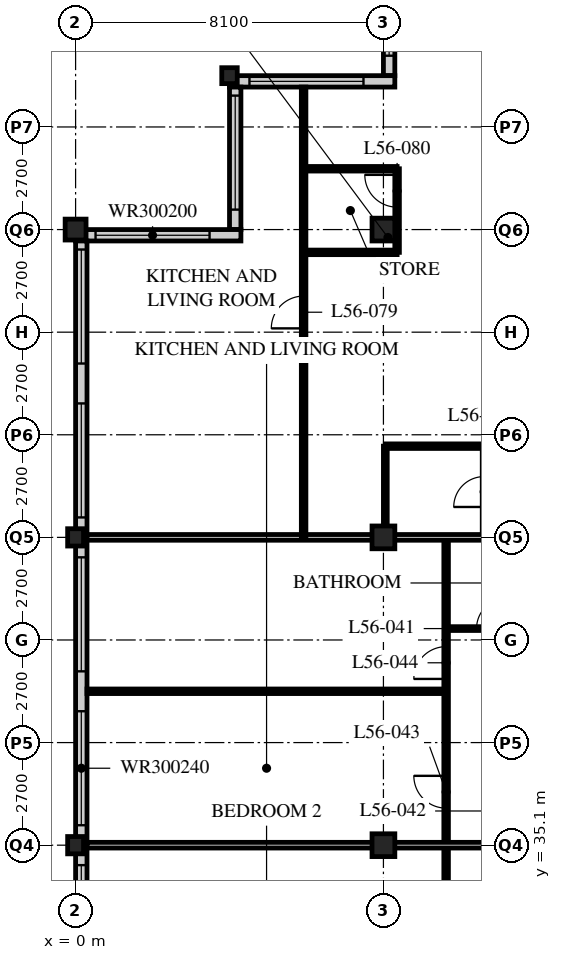
"""IFC4 building model, lengths in metres.
Left out: names, types, materials, properties, quantities, classifications, styles, units other than length and angle.
Written with IfcOpenShell. Run it as: python <this file> out.ifc"""

import sys

from ifc_helpers import new_model, si_unit, direction, frame, frame_2d, origin, origin_2d, place, context, subcontext, project, spatial, rectangle, hollow_rectangle, i_section, extrude, element, fill, save


model = new_model("IFC4")
c1 = context("Model", 3, precision=1e-05, world=origin(), true_north=direction((0.0, 1.0)))
c2 = subcontext(c1, "Body", "Model", "MODEL_VIEW")
j1 = project(units=[si_unit("LENGTHUNIT", "METRE"), si_unit("PLANEANGLEUNIT", "RADIAN")], contexts=[c1])
p1 = place(None, origin())
s1 = spatial("IfcSite", under=j1, at=p1, CompositionType="ELEMENT")
p2 = place(p1, origin())
s2 = spatial("IfcBuilding", under=s1, at=p2, CompositionType="ELEMENT")
p3 = place(p2, frame((0.0, 0.0, 217.2)))
s3 = spatial("IfcBuildingStorey", under=s2, at=p3, CompositionType="ELEMENT", Elevation=217.2)
for number, where, z_axis, x_axis in (
    (1, (0.0, 35.1, 0.0), (0.0, 0.0, 1.0), (1.0, 0.0, 0.0)),
    (2, (0.0, 43.2, 0.0), (0.0, 0.0, 1.0), (1.0, 0.0, 0.0)),
):
    element("IfcColumn", number, at=place(p3, frame(where, z_axis=z_axis, x_axis=x_axis)), inside=s3, PredefinedType="COLUMN", context=c2, shape_type="SweptSolid", body=[
        extrude(i_section(OverallWidth=0.418, OverallDepth=0.456, WebThickness=0.042, FlangeThickness=0.067, FilletRadius=0.015, at=origin_2d()), origin(), (0.0, 0.0, 1.0), 3.6),
    ])
p4 = place(p3, frame((0.0, 51.3, 0.0), z_axis=(0.0, 0.0, 1.0), x_axis=(1.0, 0.0, 0.0)))
e3 = element("IfcColumn", 3, at=p4, inside=s3, PredefinedType="COLUMN", context=c2, shape_type="SweptSolid", body=[
    extrude(hollow_rectangle(XDim=0.55, YDim=0.55, WallThickness=0.045, at=origin_2d()), origin(), (0.0, 0.0, 1.0), 3.6),
])
p5 = place(p3, frame((4.05, 55.35, 0.0), z_axis=(0.0, 0.0, 1.0), x_axis=(1.0, 0.0, 0.0)))
e4 = element("IfcColumn", 4, at=p5, inside=s3, PredefinedType="COLUMN", context=c2, shape_type="SweptSolid", body=[
    extrude(i_section(OverallWidth=0.407, OverallDepth=0.419, WebThickness=0.031, FlangeThickness=0.049, FilletRadius=0.015, at=origin_2d()), origin(), (0.0, 0.0, 1.0), 3.6),
])
for number, where, z_axis, x_axis in (
    (5, (8.1, 35.1, 0.0), (0.0, 0.0, 1.0), (1.0, 0.0, 0.0)),
    (6, (8.1, 43.2, 0.0), (0.0, 0.0, 1.0), (1.0, 0.0, 0.0)),
    (7, (8.1, 51.3, 0.0), (0.0, 0.0, 1.0), (1.0, 0.0, 0.0)),
):
    element("IfcColumn", number, at=place(p3, frame(where, z_axis=z_axis, x_axis=x_axis)), inside=s3, PredefinedType="COLUMN", context=c2, shape_type="SweptSolid", body=[
        extrude(hollow_rectangle(XDim=0.6, YDim=0.6, WallThickness=0.05, at=origin_2d()), origin(), (0.0, 0.0, 1.0), 3.6),
    ])
p6 = place(p3, frame((8.25, 59.1, 0.0), z_axis=(0.0, 0.0, 1.0), x_axis=(0.0, -1.0, 0.0)))
e8 = element("IfcWall", 8, at=p6, inside=s3, PredefinedType="SOLIDWALL", context=c2, shape_type="SweptSolid", body=[
    extrude(rectangle(XDim=3.75, YDim=0.3, at=frame_2d((1.875, 0.0))), origin(), (0.0, 0.0, 1.0), 3.39),
])
p7 = place(p6, frame((0.225, 0.0, 0.6)))
e9 = element("IfcOpeningElement", 9, at=p7, cuts=e8, PredefinedType="OPENING", context=c2, shape_type="SweptSolid", body=[
    extrude(rectangle(XDim=3.0, YDim=2.0, at=frame_2d((1.5, 1.0))), frame((0.0, 0.16, 0.0), z_axis=(0.0, -1.0, 0.0), x_axis=(1.0, 0.0, 0.0)), (0.0, 0.0, 1.0), 0.32),
])
p8 = place(p3, frame((8.4, 55.2, 0.0), z_axis=(0.0, 0.0, 1.0), x_axis=(-1.0, 0.0, 0.0)))
e10 = element("IfcWall", 10, at=p8, inside=s3, PredefinedType="SOLIDWALL", context=c2, shape_type="SweptSolid", body=[
    extrude(rectangle(XDim=4.35, YDim=0.3, at=frame_2d((2.175, 0.0))), origin(), (0.0, 0.0, 1.0), 3.39),
])
p9 = place(p8, frame((0.825, 0.0, 0.6)))
e11 = element("IfcOpeningElement", 11, at=p9, cuts=e10, PredefinedType="OPENING", context=c2, shape_type="SweptSolid", body=[
    extrude(rectangle(XDim=3.0, YDim=2.0, at=frame_2d((1.5, 1.0))), frame((0.0, 0.16, 0.0), z_axis=(0.0, -1.0, 0.0), x_axis=(1.0, 0.0, 0.0)), (0.0, 0.0, 1.0), 0.32),
])
p10 = place(p3, frame((4.2, 55.05, 0.0), z_axis=(0.0, 0.0, 1.0), x_axis=(0.0, -1.0, 0.0)))
e12 = element("IfcWall", 12, at=p10, inside=s3, PredefinedType="SOLIDWALL", context=c2, shape_type="SweptSolid", body=[
    extrude(rectangle(XDim=3.75, YDim=0.3, at=frame_2d((1.875, 0.0))), origin(), (0.0, 0.0, 1.0), 3.39),
])
p11 = place(p10, frame((0.225, 0.0, 0.6)))
e13 = element("IfcOpeningElement", 13, at=p11, cuts=e12, PredefinedType="OPENING", context=c2, shape_type="SweptSolid", body=[
    extrude(rectangle(XDim=3.0, YDim=2.0, at=frame_2d((1.5, 1.0))), frame((0.0, 0.16, 0.0), z_axis=(0.0, -1.0, 0.0), x_axis=(1.0, 0.0, 0.0)), (0.0, 0.0, 1.0), 0.32),
])
p12 = place(p3, frame((4.35, 51.15, 0.0), z_axis=(0.0, 0.0, 1.0), x_axis=(-1.0, 0.0, 0.0)))
e14 = element("IfcWall", 14, at=p12, inside=s3, PredefinedType="SOLIDWALL", context=c2, shape_type="SweptSolid", body=[
    extrude(rectangle(XDim=4.35, YDim=0.3, at=frame_2d((2.175, 0.0))), origin(), (0.0, 0.0, 1.0), 3.39),
])
p13 = place(p12, frame((0.825, 0.0, 0.6)))
e15 = element("IfcOpeningElement", 15, at=p13, cuts=e14, PredefinedType="OPENING", context=c2, shape_type="SweptSolid", body=[
    extrude(rectangle(XDim=3.0, YDim=2.0, at=frame_2d((1.5, 1.0))), frame((0.0, 0.16, 0.0), z_axis=(0.0, -1.0, 0.0), x_axis=(1.0, 0.0, 0.0)), (0.0, 0.0, 1.0), 0.32),
])
p14 = place(p3, frame((0.15, 51.0, 0.0), z_axis=(0.0, 0.0, 1.0), x_axis=(0.0, -1.0, 0.0)))
e16 = element("IfcWall", 16, at=p14, inside=s3, PredefinedType="SOLIDWALL", context=c2, shape_type="SweptSolid", body=[
    extrude(rectangle(XDim=32.1, YDim=0.3, at=frame_2d((16.05, 0.0))), origin(), (0.0, 0.0, 1.0), 3.39),
])
p15 = place(p14, frame((0.225, 0.0, 0.6)))
e17 = element("IfcOpeningElement", 17, at=p15, cuts=e16, PredefinedType="OPENING", context=c2, shape_type="SweptSolid", body=[
    extrude(rectangle(XDim=3.0, YDim=2.4, at=frame_2d((1.5, 1.2))), frame((0.0, 0.16, 0.0), z_axis=(0.0, -1.0, 0.0), x_axis=(1.0, 0.0, 0.0)), (0.0, 0.0, 1.0), 0.32),
])
p16 = place(p14, frame((4.275, 0.0, 0.6)))
e18 = element("IfcOpeningElement", 18, at=p16, cuts=e16, PredefinedType="OPENING", context=c2, shape_type="SweptSolid", body=[
    extrude(rectangle(XDim=3.0, YDim=2.4, at=frame_2d((1.5, 1.2))), frame((0.0, 0.16, 0.0), z_axis=(0.0, -1.0, 0.0), x_axis=(1.0, 0.0, 0.0)), (0.0, 0.0, 1.0), 0.32),
])
p17 = place(p14, frame((8.325, 0.0, 0.6)))
e19 = element("IfcOpeningElement", 19, at=p17, cuts=e16, PredefinedType="OPENING", context=c2, shape_type="SweptSolid", body=[
    extrude(rectangle(XDim=3.0, YDim=2.4, at=frame_2d((1.5, 1.2))), frame((0.0, 0.16, 0.0), z_axis=(0.0, -1.0, 0.0), x_axis=(1.0, 0.0, 0.0)), (0.0, 0.0, 1.0), 0.32),
])
p18 = place(p14, frame((12.375, 0.0, 0.6)))
e20 = element("IfcOpeningElement", 20, at=p18, cuts=e16, PredefinedType="OPENING", context=c2, shape_type="SweptSolid", body=[
    extrude(rectangle(XDim=3.0, YDim=2.4, at=frame_2d((1.5, 1.2))), frame((0.0, 0.16, 0.0), z_axis=(0.0, -1.0, 0.0), x_axis=(1.0, 0.0, 0.0)), (0.0, 0.0, 1.0), 0.32),
])
p19 = place(p14, frame((16.425, 0.0, 0.6)))
e21 = element("IfcOpeningElement", 21, at=p19, cuts=e16, PredefinedType="OPENING", context=c2, shape_type="SweptSolid", body=[
    extrude(rectangle(XDim=3.0, YDim=2.4, at=frame_2d((1.5, 1.2))), frame((0.0, 0.16, 0.0), z_axis=(0.0, -1.0, 0.0), x_axis=(1.0, 0.0, 0.0)), (0.0, 0.0, 1.0), 0.32),
])
p20 = place(p14, frame((20.475, 0.0, 0.6)))
e22 = element("IfcOpeningElement", 22, at=p20, cuts=e16, PredefinedType="OPENING", context=c2, shape_type="SweptSolid", body=[
    extrude(rectangle(XDim=3.0, YDim=2.4, at=frame_2d((1.5, 1.2))), frame((0.0, 0.16, 0.0), z_axis=(0.0, -1.0, 0.0), x_axis=(1.0, 0.0, 0.0)), (0.0, 0.0, 1.0), 0.32),
])
p21 = place(p14, frame((24.525, 0.0, 0.6)))
e23 = element("IfcOpeningElement", 23, at=p21, cuts=e16, PredefinedType="OPENING", context=c2, shape_type="SweptSolid", body=[
    extrude(rectangle(XDim=3.0, YDim=2.4, at=frame_2d((1.5, 1.2))), frame((0.0, 0.16, 0.0), z_axis=(0.0, -1.0, 0.0), x_axis=(1.0, 0.0, 0.0)), (0.0, 0.0, 1.0), 0.32),
])
p22 = place(p14, frame((28.575, 0.0, 0.6)))
e24 = element("IfcOpeningElement", 24, at=p22, cuts=e16, PredefinedType="OPENING", context=c2, shape_type="SweptSolid", body=[
    extrude(rectangle(XDim=3.0, YDim=2.4, at=frame_2d((1.5, 1.2))), frame((0.0, 0.16, 0.0), z_axis=(0.0, -1.0, 0.0), x_axis=(1.0, 0.0, 0.0)), (0.0, 0.0, 1.0), 0.32),
])
p23 = place(p3, frame((9.75, 18.9, 0.0), z_axis=(0.0, 0.0, 1.0), x_axis=(0.0, 1.0, 0.0)))
e25 = element("IfcWall", 25, at=p23, inside=s3, PredefinedType="PARTITIONING", context=c2, shape_type="SweptSolid", body=[
    extrude(rectangle(XDim=24.3, YDim=0.12, at=frame_2d((12.15, 0.0))), origin(), (0.0, 0.0, 1.0), 3.39),
])
p24 = place(p23, frame((0.975, 0.0, 0.0)))
e26 = element("IfcOpeningElement", 26, at=p24, cuts=e25, PredefinedType="OPENING", context=c2, shape_type="SweptSolid", body=[
    extrude(rectangle(XDim=0.85, YDim=2.1, at=frame_2d((0.425, 1.05))), frame((0.0, 0.07, 0.0), z_axis=(0.0, -1.0, 0.0), x_axis=(1.0, 0.0, 0.0)), (0.0, 0.0, 1.0), 0.14),
])
p25 = place(p23, frame((8.425, 0.0, 0.0)))
e27 = element("IfcOpeningElement", 27, at=p25, cuts=e25, PredefinedType="OPENING", context=c2, shape_type="SweptSolid", body=[
    extrude(rectangle(XDim=0.85, YDim=2.1, at=frame_2d((0.425, 1.05))), frame((0.0, 0.07, 0.0), z_axis=(0.0, -1.0, 0.0), x_axis=(1.0, 0.0, 0.0)), (0.0, 0.0, 1.0), 0.14),
])
p26 = place(p23, frame((12.475, 0.0, 0.0)))
e28 = element("IfcOpeningElement", 28, at=p26, cuts=e25, PredefinedType="OPENING", context=c2, shape_type="SweptSolid", body=[
    extrude(rectangle(XDim=0.85, YDim=2.1, at=frame_2d((0.425, 1.05))), frame((0.0, 0.07, 0.0), z_axis=(0.0, -1.0, 0.0), x_axis=(1.0, 0.0, 0.0)), (0.0, 0.0, 1.0), 0.14),
])
p27 = place(p23, frame((17.175, 0.0, 0.0)))
e29 = element("IfcOpeningElement", 29, at=p27, cuts=e25, PredefinedType="OPENING", context=c2, shape_type="SweptSolid", body=[
    extrude(rectangle(XDim=0.85, YDim=2.1, at=frame_2d((0.425, 1.05))), frame((0.0, 0.07, 0.0), z_axis=(0.0, -1.0, 0.0), x_axis=(1.0, 0.0, 0.0)), (0.0, 0.0, 1.0), 0.14),
])
p28 = place(p23, frame((20.575, 0.0, 0.0)))
e30 = element("IfcOpeningElement", 30, at=p28, cuts=e25, PredefinedType="OPENING", context=c2, shape_type="SweptSolid", body=[
    extrude(rectangle(XDim=0.85, YDim=2.1, at=frame_2d((0.425, 1.05))), frame((0.0, 0.07, 0.0), z_axis=(0.0, -1.0, 0.0), x_axis=(1.0, 0.0, 0.0)), (0.0, 0.0, 1.0), 0.14),
])
p29 = place(p3, frame((12.15, 35.1, 0.0), z_axis=(0.0, 0.0, 1.0), x_axis=(-1.0, 0.0, 0.0)))
e31 = element("IfcWall", 31, at=p29, inside=s3, PredefinedType="PARTITIONING", context=c2, shape_type="SweptSolid", body=[
    extrude(rectangle(XDim=11.85, YDim=0.15, at=frame_2d((5.925, 0.0))), origin(), (0.0, 0.0, 1.0), 2.778),
])
p30 = place(p3, frame((12.15, 40.8, 0.0), z_axis=(0.0, 0.0, 1.0), x_axis=(-1.0, 0.0, 0.0)))
e32 = element("IfcWall", 32, at=p30, inside=s3, PredefinedType="PARTITIONING", context=c2, shape_type="SweptSolid", body=[
    extrude(rectangle(XDim=2.4, YDim=0.1, at=frame_2d((1.2, 0.0))), origin(), (0.0, 0.0, 1.0), 3.39),
])
p31 = place(p30, frame((0.8, 0.0, 0.0)))
e33 = element("IfcOpeningElement", 33, at=p31, cuts=e32, PredefinedType="OPENING", context=c2, shape_type="SweptSolid", body=[
    extrude(rectangle(XDim=0.8, YDim=2.1, at=frame_2d((0.4, 1.05))), frame((0.0, 0.06, 0.0), z_axis=(0.0, -1.0, 0.0), x_axis=(1.0, 0.0, 0.0)), (0.0, 0.0, 1.0), 0.12),
])
p32 = place(p3, frame((9.75, 39.15, 0.0), z_axis=(0.0, 0.0, 1.0), x_axis=(-1.0, 0.0, 0.0)))
e34 = element("IfcWall", 34, at=p32, inside=s3, PredefinedType="PARTITIONING", context=c2, shape_type="SweptSolid", body=[
    extrude(rectangle(XDim=9.45, YDim=0.12, at=frame_2d((4.725, 0.0))), origin(), (0.0, 0.0, 1.0), 3.39),
])
p33 = place(p3, frame((8.15, 43.2, 0.0), z_axis=(0.0, 0.0, 1.0), x_axis=(0.0, 1.0, 0.0)))
e35 = element("IfcWall", 35, at=p33, inside=s3, PredefinedType="PARTITIONING", context=c2, shape_type="SweptSolid", body=[
    extrude(rectangle(XDim=2.4, YDim=0.1, at=frame_2d((1.2, 0.0))), origin(), (0.0, 0.0, 1.0), 2.778),
])
p34 = place(p3, frame((8.15, 45.6, 0.0), z_axis=(0.0, 0.0, 1.0), x_axis=(1.0, 0.0, 0.0)))
e36 = element("IfcWall", 36, at=p34, inside=s3, PredefinedType="PARTITIONING", context=c2, shape_type="SweptSolid", body=[
    extrude(rectangle(XDim=28.3, YDim=0.12, at=frame_2d((14.15, 0.0))), origin(), (0.0, 0.0, 1.0), 3.39),
])
p35 = place(p34, frame((9.025, 0.0, 0.0)))
e37 = element("IfcOpeningElement", 37, at=p35, cuts=e36, PredefinedType="OPENING", context=c2, shape_type="SweptSolid", body=[
    extrude(rectangle(XDim=0.85, YDim=2.1, at=frame_2d((0.425, 1.05))), frame((0.0, 0.07, 0.0), z_axis=(0.0, -1.0, 0.0), x_axis=(1.0, 0.0, 0.0)), (0.0, 0.0, 1.0), 0.14),
])
p36 = place(p34, frame((16.475, 0.0, 0.0)))
e38 = element("IfcOpeningElement", 38, at=p36, cuts=e36, PredefinedType="OPENING", context=c2, shape_type="SweptSolid", body=[
    extrude(rectangle(XDim=0.85, YDim=2.1, at=frame_2d((0.425, 1.05))), frame((0.0, 0.07, 0.0), z_axis=(0.0, -1.0, 0.0), x_axis=(1.0, 0.0, 0.0)), (0.0, 0.0, 1.0), 0.14),
])
p37 = place(p34, frame((20.525, 0.0, 0.0)))
e39 = element("IfcOpeningElement", 39, at=p37, cuts=e36, PredefinedType="OPENING", context=c2, shape_type="SweptSolid", body=[
    extrude(rectangle(XDim=0.85, YDim=2.1, at=frame_2d((0.425, 1.05))), frame((0.0, 0.07, 0.0), z_axis=(0.0, -1.0, 0.0), x_axis=(1.0, 0.0, 0.0)), (0.0, 0.0, 1.0), 0.14),
])
p38 = place(p34, frame((24.575, 0.0, 0.0)))
e40 = element("IfcOpeningElement", 40, at=p38, cuts=e36, PredefinedType="OPENING", context=c2, shape_type="SweptSolid", body=[
    extrude(rectangle(XDim=0.85, YDim=2.1, at=frame_2d((0.425, 1.05))), frame((0.0, 0.07, 0.0), z_axis=(0.0, -1.0, 0.0), x_axis=(1.0, 0.0, 0.0)), (0.0, 0.0, 1.0), 0.14),
])
p39 = place(p34, frame((6.725, 0.0, 0.0)))
e41 = element("IfcOpeningElement", 41, at=p39, cuts=e36, PredefinedType="OPENING", context=c2, shape_type="SweptSolid", body=[
    extrude(rectangle(XDim=0.85, YDim=2.1, at=frame_2d((0.425, 1.05))), frame((0.0, 0.07, 0.0), z_axis=(0.0, -1.0, 0.0), x_axis=(1.0, 0.0, 0.0)), (0.0, 0.0, 1.0), 0.14),
])
p40 = place(p34, frame((2.875, 0.0, 0.0)))
e42 = element("IfcOpeningElement", 42, at=p40, cuts=e36, PredefinedType="OPENING", context=c2, shape_type="SweptSolid", body=[
    extrude(rectangle(XDim=0.85, YDim=2.1, at=frame_2d((0.425, 1.05))), frame((0.0, 0.07, 0.0), z_axis=(0.0, -1.0, 0.0), x_axis=(1.0, 0.0, 0.0)), (0.0, 0.0, 1.0), 0.14),
])
p41 = place(p3, frame((0.3, 43.2, 0.0), z_axis=(0.0, 0.0, 1.0), x_axis=(1.0, 0.0, 0.0)))
e43 = element("IfcWall", 43, at=p41, inside=s3, PredefinedType="PARTITIONING", context=c2, shape_type="SweptSolid", body=[
    extrude(rectangle(XDim=11.85, YDim=0.15, at=frame_2d((5.925, 0.0))), origin(), (0.0, 0.0, 1.0), 2.778),
])
p42 = place(p3, frame((6.0, 43.2, 0.0), z_axis=(0.0, 0.0, 1.0), x_axis=(0.0, 1.0, 0.0)))
e44 = element("IfcWall", 44, at=p42, inside=s3, PredefinedType="PARTITIONING", context=c2, shape_type="SweptSolid", body=[
    extrude(rectangle(XDim=11.85, YDim=0.12, at=frame_2d((5.925, 0.0))), origin(), (0.0, 0.0, 1.0), 3.39),
])
p43 = place(p42, frame((5.5, 0.0, 0.0)))
e45 = element("IfcOpeningElement", 45, at=p43, cuts=e44, PredefinedType="OPENING", context=c2, shape_type="SweptSolid", body=[
    extrude(rectangle(XDim=0.85, YDim=2.1, at=frame_2d((0.425, 1.05))), frame((0.0, 0.07, 0.0), z_axis=(0.0, -1.0, 0.0), x_axis=(1.0, 0.0, 0.0)), (0.0, 0.0, 1.0), 0.14),
])
for number, where, z_axis, x_axis in (
    (46, (6.0, 50.7, 0.0), (0.0, 0.0, 1.0), (1.0, 0.0, 0.0)),
    (47, (6.0, 52.9, 0.0), (0.0, 0.0, 1.0), (1.0, 0.0, 0.0)),
):
    element("IfcWall", number, at=place(p3, frame(where, z_axis=z_axis, x_axis=x_axis)), inside=s3, PredefinedType="PARTITIONING", context=c2, shape_type="SweptSolid", body=[
        extrude(rectangle(XDim=2.46, YDim=0.12, at=frame_2d((1.23, 0.0))), origin(), (0.0, 0.0, 1.0), 3.39),
    ])
p44 = place(p3, frame((8.46, 50.7, 0.0), z_axis=(0.0, 0.0, 1.0), x_axis=(0.0, 1.0, 0.0)))
e48 = element("IfcWall", 48, at=p44, inside=s3, PredefinedType="PARTITIONING", context=c2, shape_type="SweptSolid", body=[
    extrude(rectangle(XDim=2.2, YDim=0.12, at=frame_2d((1.1, 0.0))), origin(), (0.0, 0.0, 1.0), 3.39),
])
p45 = place(p44, frame((1.19, 0.0, 0.0)))
e49 = element("IfcOpeningElement", 49, at=p45, cuts=e48, PredefinedType="OPENING", context=c2, shape_type="SweptSolid", body=[
    extrude(rectangle(XDim=0.85, YDim=2.1, at=frame_2d((0.425, 1.05))), frame((0.0, 0.07, 0.0), z_axis=(0.0, -1.0, 0.0), x_axis=(1.0, 0.0, 0.0)), (0.0, 0.0, 1.0), 0.14),
])
p46 = place(p7, origin())
e50 = element("IfcWindow", 50, at=p46, inside=s3, PartitioningType="SINGLE_PANEL", PredefinedType="WINDOW", context=c2, shape_type="SweptSolid", body=[
    extrude(rectangle(XDim=3.0, YDim=2.0, at=frame_2d((1.5, 1.0))), frame((0.0, 0.03, 0.0), z_axis=(0.0, -1.0, 0.0), x_axis=(1.0, 0.0, 0.0)), (0.0, 0.0, 1.0), 0.06),
])
fill(e9, e50)
p47 = place(p9, origin())
e51 = element("IfcWindow", 51, at=p47, inside=s3, PartitioningType="SINGLE_PANEL", PredefinedType="WINDOW", context=c2, shape_type="SweptSolid", body=[
    extrude(rectangle(XDim=3.0, YDim=2.0, at=frame_2d((1.5, 1.0))), frame((0.0, 0.03, 0.0), z_axis=(0.0, -1.0, 0.0), x_axis=(1.0, 0.0, 0.0)), (0.0, 0.0, 1.0), 0.06),
])
fill(e11, e51)
p48 = place(p11, origin())
e52 = element("IfcWindow", 52, at=p48, inside=s3, PartitioningType="SINGLE_PANEL", PredefinedType="WINDOW", context=c2, shape_type="SweptSolid", body=[
    extrude(rectangle(XDim=3.0, YDim=2.0, at=frame_2d((1.5, 1.0))), frame((0.0, 0.03, 0.0), z_axis=(0.0, -1.0, 0.0), x_axis=(1.0, 0.0, 0.0)), (0.0, 0.0, 1.0), 0.06),
])
fill(e13, e52)
p49 = place(p13, origin())
e53 = element("IfcWindow", 53, at=p49, inside=s3, PartitioningType="SINGLE_PANEL", PredefinedType="WINDOW", context=c2, shape_type="SweptSolid", body=[
    extrude(rectangle(XDim=3.0, YDim=2.0, at=frame_2d((1.5, 1.0))), frame((0.0, 0.03, 0.0), z_axis=(0.0, -1.0, 0.0), x_axis=(1.0, 0.0, 0.0)), (0.0, 0.0, 1.0), 0.06),
])
fill(e15, e53)
p50 = place(p15, origin())
e54 = element("IfcWindow", 54, at=p50, inside=s3, PartitioningType="SINGLE_PANEL", PredefinedType="WINDOW", context=c2, shape_type="SweptSolid", body=[
    extrude(rectangle(XDim=3.0, YDim=2.4, at=frame_2d((1.5, 1.2))), frame((0.0, 0.03, 0.0), z_axis=(0.0, -1.0, 0.0), x_axis=(1.0, 0.0, 0.0)), (0.0, 0.0, 1.0), 0.06),
])
fill(e17, e54)
p51 = place(p16, origin())
e55 = element("IfcWindow", 55, at=p51, inside=s3, PartitioningType="SINGLE_PANEL", PredefinedType="WINDOW", context=c2, shape_type="SweptSolid", body=[
    extrude(rectangle(XDim=3.0, YDim=2.4, at=frame_2d((1.5, 1.2))), frame((0.0, 0.03, 0.0), z_axis=(0.0, -1.0, 0.0), x_axis=(1.0, 0.0, 0.0)), (0.0, 0.0, 1.0), 0.06),
])
fill(e18, e55)
p52 = place(p17, origin())
e56 = element("IfcWindow", 56, at=p52, inside=s3, PartitioningType="SINGLE_PANEL", PredefinedType="WINDOW", context=c2, shape_type="SweptSolid", body=[
    extrude(rectangle(XDim=3.0, YDim=2.4, at=frame_2d((1.5, 1.2))), frame((0.0, 0.03, 0.0), z_axis=(0.0, -1.0, 0.0), x_axis=(1.0, 0.0, 0.0)), (0.0, 0.0, 1.0), 0.06),
])
fill(e19, e56)
p53 = place(p18, origin())
e57 = element("IfcWindow", 57, at=p53, inside=s3, PartitioningType="SINGLE_PANEL", PredefinedType="WINDOW", context=c2, shape_type="SweptSolid", body=[
    extrude(rectangle(XDim=3.0, YDim=2.4, at=frame_2d((1.5, 1.2))), frame((0.0, 0.03, 0.0), z_axis=(0.0, -1.0, 0.0), x_axis=(1.0, 0.0, 0.0)), (0.0, 0.0, 1.0), 0.06),
])
fill(e20, e57)
p54 = place(p19, origin())
e58 = element("IfcWindow", 58, at=p54, inside=s3, PartitioningType="SINGLE_PANEL", PredefinedType="WINDOW", context=c2, shape_type="SweptSolid", body=[
    extrude(rectangle(XDim=3.0, YDim=2.4, at=frame_2d((1.5, 1.2))), frame((0.0, 0.03, 0.0), z_axis=(0.0, -1.0, 0.0), x_axis=(1.0, 0.0, 0.0)), (0.0, 0.0, 1.0), 0.06),
])
fill(e21, e58)
p55 = place(p31, origin())
e59 = element("IfcDoor", 59, at=p55, inside=s3, OperationType="SINGLE_SWING_RIGHT", PredefinedType="DOOR", context=c2, shape_type="SweptSolid", body=[
    extrude(rectangle(XDim=0.8, YDim=2.1, at=frame_2d((0.4, 1.05))), frame((0.0, 0.025, 0.0), z_axis=(0.0, -1.0, 0.0), x_axis=(1.0, 0.0, 0.0)), (0.0, 0.0, 1.0), 0.05),
])
fill(e33, e59)
p56 = place(p27, origin())
e60 = element("IfcDoor", 60, at=p56, inside=s3, OperationType="SINGLE_SWING_RIGHT", PredefinedType="DOOR", context=c2, shape_type="SweptSolid", body=[
    extrude(rectangle(XDim=0.85, YDim=2.1, at=frame_2d((0.425, 1.05))), frame((0.0, 0.025, 0.0), z_axis=(0.0, -1.0, 0.0), x_axis=(1.0, 0.0, 0.0)), (0.0, 0.0, 1.0), 0.05),
])
fill(e29, e60)
p57 = place(p28, origin())
e61 = element("IfcDoor", 61, at=p57, inside=s3, OperationType="SINGLE_SWING_LEFT", PredefinedType="DOOR", context=c2, shape_type="SweptSolid", body=[
    extrude(rectangle(XDim=0.85, YDim=2.1, at=frame_2d((0.425, 1.05))), frame((0.0, 0.025, 0.0), z_axis=(0.0, -1.0, 0.0), x_axis=(1.0, 0.0, 0.0)), (0.0, 0.0, 1.0), 0.05),
])
fill(e30, e61)
p58 = place(p43, origin())
e62 = element("IfcDoor", 62, at=p58, inside=s3, OperationType="SINGLE_SWING_LEFT", PredefinedType="DOOR", context=c2, shape_type="SweptSolid", body=[
    extrude(rectangle(XDim=0.85, YDim=2.1, at=frame_2d((0.425, 1.05))), frame((0.0, 0.025, 0.0), z_axis=(0.0, -1.0, 0.0), x_axis=(1.0, 0.0, 0.0)), (0.0, 0.0, 1.0), 0.05),
])
fill(e45, e62)
p59 = place(p45, origin())
e63 = element("IfcDoor", 63, at=p59, inside=s3, OperationType="SINGLE_SWING_RIGHT", PredefinedType="DOOR", context=c2, shape_type="SweptSolid", body=[
    extrude(rectangle(XDim=0.85, YDim=2.1, at=frame_2d((0.425, 1.05))), frame((0.0, 0.025, 0.0), z_axis=(0.0, -1.0, 0.0), x_axis=(1.0, 0.0, 0.0)), (0.0, 0.0, 1.0), 0.05),
])
fill(e49, e63)
save(model, sys.argv[1])
